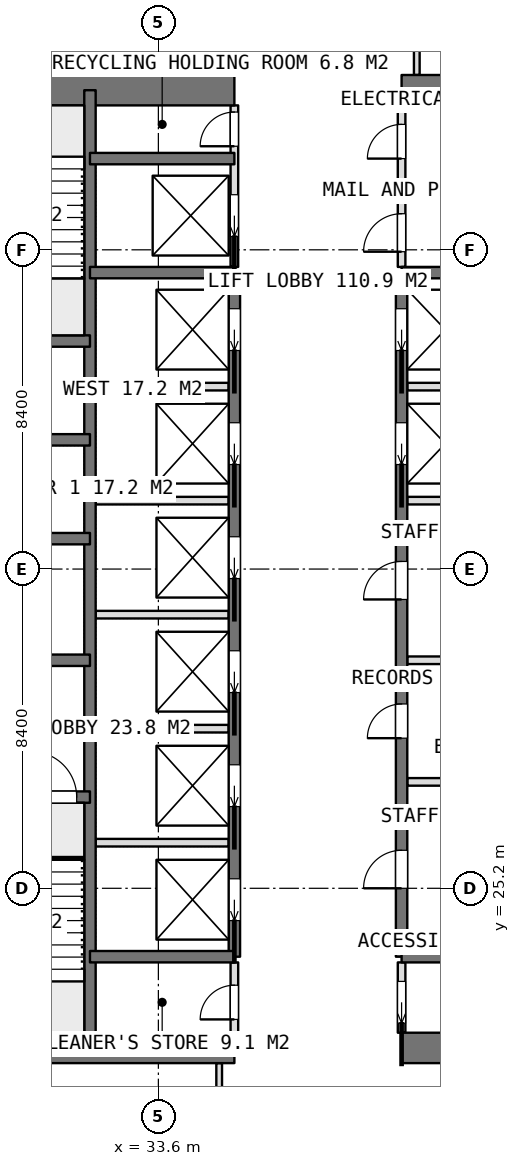
"""IFC4 building model, lengths in metres.
Left out: names, types, materials, properties, quantities, classifications, styles, units other than length and angle.
Written with IfcOpenShell. Run it as: python <this file> out.ifc"""

import sys

from ifc_helpers import new_model, si_unit, direction, frame, frame_2d, origin, place, context, subcontext, project, spatial, rectangle, extrude, element, fill, save


model = new_model("IFC4")
c1 = context("Model", 3, precision=1e-05, world=origin(), true_north=direction((0.0, 1.0)))
c2 = subcontext(c1, "Body", "Model", "MODEL_VIEW")
j1 = project(units=[si_unit("LENGTHUNIT", "METRE"), si_unit("PLANEANGLEUNIT", "RADIAN")], contexts=[c1])
p1 = place(None, origin())
s1 = spatial("IfcSite", under=j1, at=p1, CompositionType="ELEMENT")
p2 = place(p1, origin())
s2 = spatial("IfcBuilding", under=s1, at=p2, CompositionType="ELEMENT")
p3 = place(p2, frame((0.0, 0.0, 291.35)))
s3 = spatial("IfcBuildingStorey", under=s2, at=p3, CompositionType="ELEMENT", Elevation=291.35)
p4 = place(p3, frame((25.2, 21.0, 0.0), z_axis=(0.0, 0.0, 1.0), x_axis=(1.0, 0.0, 0.0)))
e1 = element("IfcWall", 1, at=p4, inside=s3, PredefinedType="SHEAR", context=c2, shape_type="SweptSolid", body=[
    extrude(rectangle(XDim=10.4, YDim=0.8, at=frame_2d((5.2, 0.0))), origin(), (0.0, 0.0, 1.0), 5.4),
])
p5 = place(p3, frame((40.0, 21.0, 0.0), z_axis=(0.0, 0.0, 1.0), x_axis=(1.0, 0.0, 0.0)))
e2 = element("IfcWall", 2, at=p5, inside=s3, PredefinedType="SHEAR", context=c2, shape_type="SweptSolid", body=[
    extrude(rectangle(XDim=10.4, YDim=0.8, at=frame_2d((5.2, 0.0))), origin(), (0.0, 0.0, 1.0), 5.4),
])
p6 = place(p3, frame((25.2, 46.2, 0.0), z_axis=(0.0, 0.0, 1.0), x_axis=(1.0, 0.0, 0.0)))
e3 = element("IfcWall", 3, at=p6, inside=s3, PredefinedType="SHEAR", context=c2, shape_type="SweptSolid", body=[
    extrude(rectangle(XDim=10.4, YDim=0.8, at=frame_2d((5.2, 0.0))), origin(), (0.0, 0.0, 1.0), 5.4),
])
p7 = place(p3, frame((40.0, 46.2, 0.0), z_axis=(0.0, 0.0, 1.0), x_axis=(1.0, 0.0, 0.0)))
e4 = element("IfcWall", 4, at=p7, inside=s3, PredefinedType="SHEAR", context=c2, shape_type="SweptSolid", body=[
    extrude(rectangle(XDim=10.4, YDim=0.8, at=frame_2d((5.2, 0.0))), origin(), (0.0, 0.0, 1.0), 5.4),
])
p8 = place(p3, frame((31.8, 21.0, 0.0), z_axis=(0.0, 0.0, 1.0), x_axis=(0.0, 1.0, 0.0)))
e5 = element("IfcWall", 5, at=p8, inside=s3, PredefinedType="SHEAR", context=c2, shape_type="SweptSolid", body=[
    extrude(rectangle(XDim=25.2, YDim=0.3, at=frame_2d((12.6, 0.0))), origin(), (0.0, 0.0, 1.0), 5.4),
])
p9 = place(p3, frame((35.6, 23.4, 0.0), z_axis=(0.0, 0.0, 1.0), x_axis=(0.0, 1.0, 0.0)))
e6 = element("IfcWall", 6, at=p9, inside=s3, PredefinedType="SHEAR", context=c2, shape_type="SweptSolid", body=[
    extrude(rectangle(XDim=18.0, YDim=0.3, at=frame_2d((9.0, 0.0))), origin(), (0.0, 0.0, 1.0), 5.4),
])
p10 = place(p9, frame((0.95, 0.0, 0.0)))
e7 = element("IfcOpeningElement", 7, at=p10, cuts=e6, PredefinedType="OPENING", context=c2, shape_type="SweptSolid", body=[
    extrude(rectangle(XDim=1.1, YDim=2.1, at=frame_2d((0.55, 1.05))), frame((0.0, 0.16, 0.0), z_axis=(0.0, -1.0, 0.0), x_axis=(1.0, 0.0, 0.0)), (0.0, 0.0, 1.0), 0.32),
])
p11 = place(p9, frame((3.95, 0.0, 0.0)))
e8 = element("IfcOpeningElement", 8, at=p11, cuts=e6, PredefinedType="OPENING", context=c2, shape_type="SweptSolid", body=[
    extrude(rectangle(XDim=1.1, YDim=2.1, at=frame_2d((0.55, 1.05))), frame((0.0, 0.16, 0.0), z_axis=(0.0, -1.0, 0.0), x_axis=(1.0, 0.0, 0.0)), (0.0, 0.0, 1.0), 0.32),
])
p12 = place(p9, frame((6.95, 0.0, 0.0)))
e9 = element("IfcOpeningElement", 9, at=p12, cuts=e6, PredefinedType="OPENING", context=c2, shape_type="SweptSolid", body=[
    extrude(rectangle(XDim=1.1, YDim=2.1, at=frame_2d((0.55, 1.05))), frame((0.0, 0.16, 0.0), z_axis=(0.0, -1.0, 0.0), x_axis=(1.0, 0.0, 0.0)), (0.0, 0.0, 1.0), 0.32),
])
p13 = place(p9, frame((9.95, 0.0, 0.0)))
e10 = element("IfcOpeningElement", 10, at=p13, cuts=e6, PredefinedType="OPENING", context=c2, shape_type="SweptSolid", body=[
    extrude(rectangle(XDim=1.1, YDim=2.1, at=frame_2d((0.55, 1.05))), frame((0.0, 0.16, 0.0), z_axis=(0.0, -1.0, 0.0), x_axis=(1.0, 0.0, 0.0)), (0.0, 0.0, 1.0), 0.32),
])
p14 = place(p9, frame((12.95, 0.0, 0.0)))
e11 = element("IfcOpeningElement", 11, at=p14, cuts=e6, PredefinedType="OPENING", context=c2, shape_type="SweptSolid", body=[
    extrude(rectangle(XDim=1.1, YDim=2.1, at=frame_2d((0.55, 1.05))), frame((0.0, 0.16, 0.0), z_axis=(0.0, -1.0, 0.0), x_axis=(1.0, 0.0, 0.0)), (0.0, 0.0, 1.0), 0.32),
])
p15 = place(p9, frame((15.95, 0.0, 0.0)))
e12 = element("IfcOpeningElement", 12, at=p15, cuts=e6, PredefinedType="OPENING", context=c2, shape_type="SweptSolid", body=[
    extrude(rectangle(XDim=1.1, YDim=2.1, at=frame_2d((0.55, 1.05))), frame((0.0, 0.16, 0.0), z_axis=(0.0, -1.0, 0.0), x_axis=(1.0, 0.0, 0.0)), (0.0, 0.0, 1.0), 0.32),
])
p16 = place(p3, frame((40.0, 23.4, 0.0), z_axis=(0.0, 0.0, 1.0), x_axis=(0.0, 1.0, 0.0)))
e13 = element("IfcWall", 13, at=p16, inside=s3, PredefinedType="SHEAR", context=c2, shape_type="SweptSolid", body=[
    extrude(rectangle(XDim=18.0, YDim=0.3, at=frame_2d((9.0, 0.0))), origin(), (0.0, 0.0, 1.0), 5.4),
])
p17 = place(p16, frame((1.8, 0.0, 0.0)))
e14 = element("IfcOpeningElement", 14, at=p17, cuts=e13, PredefinedType="OPENING", context=c2, shape_type="SweptSolid", body=[
    extrude(rectangle(XDim=1.0, YDim=2.1, at=frame_2d((0.5, 1.05))), frame((0.0, 0.16, 0.0), z_axis=(0.0, -1.0, 0.0), x_axis=(1.0, 0.0, 0.0)), (0.0, 0.0, 1.0), 0.32),
])
p18 = place(p16, frame((5.75, 0.0, 0.0)))
e15 = element("IfcOpeningElement", 15, at=p18, cuts=e13, PredefinedType="OPENING", context=c2, shape_type="SweptSolid", body=[
    extrude(rectangle(XDim=0.9, YDim=2.1, at=frame_2d((0.45, 1.05))), frame((0.0, 0.16, 0.0), z_axis=(0.0, -1.0, 0.0), x_axis=(1.0, 0.0, 0.0)), (0.0, 0.0, 1.0), 0.32),
])
p19 = place(p16, frame((9.4, 0.0, 0.0)))
e16 = element("IfcOpeningElement", 16, at=p19, cuts=e13, PredefinedType="OPENING", context=c2, shape_type="SweptSolid", body=[
    extrude(rectangle(XDim=1.0, YDim=2.1, at=frame_2d((0.5, 1.05))), frame((0.0, 0.16, 0.0), z_axis=(0.0, -1.0, 0.0), x_axis=(1.0, 0.0, 0.0)), (0.0, 0.0, 1.0), 0.32),
])
p20 = place(p16, frame((12.95, 0.0, 0.0)))
e17 = element("IfcOpeningElement", 17, at=p20, cuts=e13, PredefinedType="OPENING", context=c2, shape_type="SweptSolid", body=[
    extrude(rectangle(XDim=1.1, YDim=2.1, at=frame_2d((0.55, 1.05))), frame((0.0, 0.16, 0.0), z_axis=(0.0, -1.0, 0.0), x_axis=(1.0, 0.0, 0.0)), (0.0, 0.0, 1.0), 0.32),
])
p21 = place(p16, frame((15.95, 0.0, 0.0)))
e18 = element("IfcOpeningElement", 18, at=p21, cuts=e13, PredefinedType="OPENING", context=c2, shape_type="SweptSolid", body=[
    extrude(rectangle(XDim=1.1, YDim=2.1, at=frame_2d((0.55, 1.05))), frame((0.0, 0.16, 0.0), z_axis=(0.0, -1.0, 0.0), x_axis=(1.0, 0.0, 0.0)), (0.0, 0.0, 1.0), 0.32),
])
for number, where, z_axis, x_axis in (
    (19, (31.8, 23.4, 0.0), (0.0, 0.0, 1.0), (1.0, 0.0, 0.0)),
    (20, (31.8, 41.4, 0.0), (0.0, 0.0, 1.0), (1.0, 0.0, 0.0)),
    (21, (31.8, 44.4, 0.0), (0.0, 0.0, 1.0), (1.0, 0.0, 0.0)),
    (22, (40.0, 23.4, 0.0), (0.0, 0.0, 1.0), (1.0, 0.0, 0.0)),
    (23, (40.0, 41.4, 0.0), (0.0, 0.0, 1.0), (1.0, 0.0, 0.0)),
):
    element("IfcWall", number, at=place(p3, frame(where, z_axis=z_axis, x_axis=x_axis)), inside=s3, PredefinedType="SHEAR", context=c2, shape_type="SweptSolid", body=[
        extrude(rectangle(XDim=3.8, YDim=0.3, at=frame_2d((1.9, 0.0))), origin(), (0.0, 0.0, 1.0), 5.4),
    ])
p22 = place(p3, frame((25.2, 27.6, 0.0), z_axis=(0.0, 0.0, 1.0), x_axis=(1.0, 0.0, 0.0)))
e24 = element("IfcWall", 24, at=p22, inside=s3, PredefinedType="SHEAR", context=c2, shape_type="SweptSolid", body=[
    extrude(rectangle(XDim=6.6, YDim=0.3, at=frame_2d((3.3, 0.0))), origin(), (0.0, 0.0, 1.0), 5.4),
])
p23 = place(p22, frame((5.05, 0.0, 0.0)))
e25 = element("IfcOpeningElement", 25, at=p23, cuts=e24, PredefinedType="OPENING", context=c2, shape_type="SweptSolid", body=[
    extrude(rectangle(XDim=1.2, YDim=2.1, at=frame_2d((0.6, 1.05))), frame((0.0, 0.16, 0.0), z_axis=(0.0, -1.0, 0.0), x_axis=(1.0, 0.0, 0.0)), (0.0, 0.0, 1.0), 0.32),
])
p24 = place(p3, frame((25.2, 31.2, 0.0), z_axis=(0.0, 0.0, 1.0), x_axis=(1.0, 0.0, 0.0)))
e26 = element("IfcWall", 26, at=p24, inside=s3, PredefinedType="SHEAR", context=c2, shape_type="SweptSolid", body=[
    extrude(rectangle(XDim=6.6, YDim=0.3, at=frame_2d((3.3, 0.0))), origin(), (0.0, 0.0, 1.0), 5.4),
])
p25 = place(p24, frame((2.65, 0.0, 0.0)))
e27 = element("IfcOpeningElement", 27, at=p25, cuts=e26, PredefinedType="OPENING", context=c2, shape_type="SweptSolid", body=[
    extrude(rectangle(XDim=1.3, YDim=2.1, at=frame_2d((0.65, 1.05))), frame((0.0, 0.16, 0.0), z_axis=(0.0, -1.0, 0.0), x_axis=(1.0, 0.0, 0.0)), (0.0, 0.0, 1.0), 0.32),
])
for number, where, z_axis, x_axis in (
    (28, (25.2, 34.4, 0.0), (0.0, 0.0, 1.0), (1.0, 0.0, 0.0)),
    (29, (25.2, 37.0, 0.0), (0.0, 0.0, 1.0), (1.0, 0.0, 0.0)),
    (30, (25.2, 39.6, 0.0), (0.0, 0.0, 1.0), (1.0, 0.0, 0.0)),
):
    element("IfcWall", number, at=place(p3, frame(where, z_axis=z_axis, x_axis=x_axis)), inside=s3, PredefinedType="SHEAR", context=c2, shape_type="SweptSolid", body=[
        extrude(rectangle(XDim=6.6, YDim=0.3, at=frame_2d((3.3, 0.0))), origin(), (0.0, 0.0, 1.0), 5.4),
    ])
for number, where, z_axis, x_axis in (
    (31, (31.95, 26.4, 0.0), (0.0, 0.0, 1.0), (1.0, 0.0, 0.0)),
    (32, (31.95, 29.4, 0.0), (0.0, 0.0, 1.0), (1.0, 0.0, 0.0)),
    (33, (31.95, 32.4, 0.0), (0.0, 0.0, 1.0), (1.0, 0.0, 0.0)),
    (34, (31.95, 35.4, 0.0), (0.0, 0.0, 1.0), (1.0, 0.0, 0.0)),
    (35, (31.95, 38.4, 0.0), (0.0, 0.0, 1.0), (1.0, 0.0, 0.0)),
    (36, (40.15, 35.4, 0.0), (0.0, 0.0, 1.0), (1.0, 0.0, 0.0)),
    (37, (40.15, 38.4, 0.0), (0.0, 0.0, 1.0), (1.0, 0.0, 0.0)),
):
    element("IfcWall", number, at=place(p3, frame(where, z_axis=z_axis, x_axis=x_axis)), inside=s3, PredefinedType="PARTITIONING", context=c2, shape_type="SweptSolid", body=[
        extrude(rectangle(XDim=3.5, YDim=0.2, at=frame_2d((1.75, 0.0))), origin(), (0.0, 0.0, 1.0), 5.1),
    ])
p26 = place(p3, frame((40.0, 21.4, 0.0), z_axis=(0.0, 0.0, 1.0), x_axis=(0.0, 1.0, 0.0)))
e38 = element("IfcWall", 38, at=p26, inside=s3, PredefinedType="PARTITIONING", context=c2, shape_type="SweptSolid", body=[
    extrude(rectangle(XDim=1.85, YDim=0.2, at=frame_2d((0.925, 0.0))), origin(), (0.0, 0.0, 1.0), 5.1),
])
p27 = place(p26, frame((0.25, 0.0, 0.0)))
e39 = element("IfcOpeningElement", 39, at=p27, cuts=e38, PredefinedType="OPENING", context=c2, shape_type="SweptSolid", body=[
    extrude(rectangle(XDim=1.1, YDim=2.1, at=frame_2d((0.55, 1.05))), frame((0.0, 0.11, 0.0), z_axis=(0.0, -1.0, 0.0), x_axis=(1.0, 0.0, 0.0)), (0.0, 0.0, 1.0), 0.22),
])
p28 = place(p3, frame((40.0, 41.55, 0.0), z_axis=(0.0, 0.0, 1.0), x_axis=(0.0, 1.0, 0.0)))
e40 = element("IfcWall", 40, at=p28, inside=s3, PredefinedType="PARTITIONING", context=c2, shape_type="SweptSolid", body=[
    extrude(rectangle(XDim=4.25, YDim=0.2, at=frame_2d((2.125, 0.0))), origin(), (0.0, 0.0, 1.0), 5.1),
])
p29 = place(p28, frame((2.85, 0.0, 0.0)))
e41 = element("IfcOpeningElement", 41, at=p29, cuts=e40, PredefinedType="OPENING", context=c2, shape_type="SweptSolid", body=[
    extrude(rectangle(XDim=0.9, YDim=2.1, at=frame_2d((0.45, 1.05))), frame((0.0, 0.11, 0.0), z_axis=(0.0, -1.0, 0.0), x_axis=(1.0, 0.0, 0.0)), (0.0, 0.0, 1.0), 0.22),
])
p30 = place(p28, frame((0.4, 0.0, 0.0)))
e42 = element("IfcOpeningElement", 42, at=p30, cuts=e40, PredefinedType="OPENING", context=c2, shape_type="SweptSolid", body=[
    extrude(rectangle(XDim=1.0, YDim=2.1, at=frame_2d((0.5, 1.05))), frame((0.0, 0.11, 0.0), z_axis=(0.0, -1.0, 0.0), x_axis=(1.0, 0.0, 0.0)), (0.0, 0.0, 1.0), 0.22),
])
p31 = place(p3, frame((35.6, 41.55, 0.0), z_axis=(0.0, 0.0, 1.0), x_axis=(0.0, 1.0, 0.0)))
e43 = element("IfcWall", 43, at=p31, inside=s3, PredefinedType="PARTITIONING", context=c2, shape_type="SweptSolid", body=[
    extrude(rectangle(XDim=4.25, YDim=0.2, at=frame_2d((2.125, 0.0))), origin(), (0.0, 0.0, 1.0), 5.1),
])
p32 = place(p31, frame((3.175, 0.0, 0.0)))
e44 = element("IfcOpeningElement", 44, at=p32, cuts=e43, PredefinedType="OPENING", context=c2, shape_type="SweptSolid", body=[
    extrude(rectangle(XDim=0.9, YDim=2.1, at=frame_2d((0.45, 1.05))), frame((0.0, 0.11, 0.0), z_axis=(0.0, -1.0, 0.0), x_axis=(1.0, 0.0, 0.0)), (0.0, 0.0, 1.0), 0.22),
])
p33 = place(p31, frame((0.8, 0.0, 0.0)))
e45 = element("IfcOpeningElement", 45, at=p33, cuts=e43, PredefinedType="OPENING", context=c2, shape_type="SweptSolid", body=[
    extrude(rectangle(XDim=1.1, YDim=2.1, at=frame_2d((0.55, 1.05))), frame((0.0, 0.11, 0.0), z_axis=(0.0, -1.0, 0.0), x_axis=(1.0, 0.0, 0.0)), (0.0, 0.0, 1.0), 0.22),
])
p34 = place(p3, frame((35.6, 21.4, 0.0), z_axis=(0.0, 0.0, 1.0), x_axis=(0.0, 1.0, 0.0)))
e46 = element("IfcWall", 46, at=p34, inside=s3, PredefinedType="PARTITIONING", context=c2, shape_type="SweptSolid", body=[
    extrude(rectangle(XDim=1.85, YDim=0.2, at=frame_2d((0.925, 0.0))), origin(), (0.0, 0.0, 1.0), 5.1),
])
p35 = place(p34, frame((0.35, 0.0, 0.0)))
e47 = element("IfcOpeningElement", 47, at=p35, cuts=e46, PredefinedType="OPENING", context=c2, shape_type="SweptSolid", body=[
    extrude(rectangle(XDim=0.9, YDim=2.1, at=frame_2d((0.45, 1.05))), frame((0.0, 0.11, 0.0), z_axis=(0.0, -1.0, 0.0), x_axis=(1.0, 0.0, 0.0)), (0.0, 0.0, 1.0), 0.22),
])
for number, where, z_axis, x_axis in (
    (48, (40.15, 28.0, 0.0), (0.0, 0.0, 1.0), (1.0, 0.0, 0.0)),
    (49, (40.15, 31.2, 0.0), (0.0, 0.0, 1.0), (1.0, 0.0, 0.0)),
):
    element("IfcWall", number, at=place(p3, frame(where, z_axis=z_axis, x_axis=x_axis)), inside=s3, PredefinedType="PARTITIONING", context=c2, shape_type="SweptSolid", body=[
        extrude(rectangle(XDim=3.5, YDim=0.2, at=frame_2d((1.75, 0.0))), origin(), (0.0, 0.0, 1.0), 5.1),
    ])
p36 = place(p3, frame((40.0, 43.5, 0.0), z_axis=(0.0, 0.0, 1.0), x_axis=(1.0, 0.0, 0.0)))
e50 = element("IfcWall", 50, at=p36, inside=s3, PredefinedType="PARTITIONING", context=c2, shape_type="SweptSolid", body=[
    extrude(rectangle(XDim=3.65, YDim=0.2, at=frame_2d((1.825, 0.0))), origin(), (0.0, 0.0, 1.0), 5.1),
])
for number, where, z_axis, x_axis in (
    (51, (40.4, 46.6, 0.0), (0.0, 0.0, 1.0), (0.0, 1.0, 0.0)),
    (52, (35.2, 46.6, 0.0), (0.0, 0.0, 1.0), (0.0, 1.0, 0.0)),
):
    element("IfcWall", number, at=place(p3, frame(where, z_axis=z_axis, x_axis=x_axis)), inside=s3, PredefinedType="PARTITIONING", context=c2, shape_type="SweptSolid", body=[
        extrude(rectangle(XDim=2.725, YDim=0.15, at=frame_2d((1.362, 0.0))), origin(), (0.0, 0.0, 1.0), 5.1),
    ])
p37 = place(p3, frame((35.2, 17.875, 0.0), z_axis=(0.0, 0.0, 1.0), x_axis=(0.0, 1.0, 0.0)))
e53 = element("IfcWall", 53, at=p37, inside=s3, PredefinedType="PARTITIONING", context=c2, shape_type="SweptSolid", body=[
    extrude(rectangle(XDim=2.725, YDim=0.15, at=frame_2d((1.363, 0.0))), origin(), (0.0, 0.0, 1.0), 5.1),
])
p38 = place(p27, origin())
e54 = element("IfcDoor", 54, at=p38, inside=s3, OperationType="SLIDING_TO_LEFT", PredefinedType="DOOR", context=c2, shape_type="SweptSolid", body=[
    extrude(rectangle(XDim=1.1, YDim=2.1, at=frame_2d((0.55, 1.05))), frame((0.0, 0.025, 0.0), z_axis=(0.0, -1.0, 0.0), x_axis=(1.0, 0.0, 0.0)), (0.0, 0.0, 1.0), 0.05),
])
fill(e39, e54)
p39 = place(p35, origin())
e55 = element("IfcDoor", 55, at=p39, inside=s3, OperationType="SINGLE_SWING_LEFT", PredefinedType="DOOR", context=c2, shape_type="SweptSolid", body=[
    extrude(rectangle(XDim=0.9, YDim=2.1, at=frame_2d((0.45, 1.05))), frame((0.0, 0.025, 0.0), z_axis=(0.0, -1.0, 0.0), x_axis=(1.0, 0.0, 0.0)), (0.0, 0.0, 1.0), 0.05),
])
fill(e47, e55)
p40 = place(p29, origin())
e56 = element("IfcDoor", 56, at=p40, inside=s3, OperationType="SINGLE_SWING_LEFT", PredefinedType="DOOR", context=c2, shape_type="SweptSolid", body=[
    extrude(rectangle(XDim=0.9, YDim=2.1, at=frame_2d((0.45, 1.05))), frame((0.0, 0.025, 0.0), z_axis=(0.0, -1.0, 0.0), x_axis=(1.0, 0.0, 0.0)), (0.0, 0.0, 1.0), 0.05),
])
fill(e41, e56)
p41 = place(p30, origin())
e57 = element("IfcDoor", 57, at=p41, inside=s3, OperationType="SINGLE_SWING_LEFT", PredefinedType="DOOR", context=c2, shape_type="SweptSolid", body=[
    extrude(rectangle(XDim=1.0, YDim=2.1, at=frame_2d((0.5, 1.05))), frame((0.0, 0.025, 0.0), z_axis=(0.0, -1.0, 0.0), x_axis=(1.0, 0.0, 0.0)), (0.0, 0.0, 1.0), 0.05),
])
fill(e42, e57)
p42 = place(p17, origin())
e58 = element("IfcDoor", 58, at=p42, inside=s3, OperationType="SINGLE_SWING_LEFT", PredefinedType="DOOR", context=c2, shape_type="SweptSolid", body=[
    extrude(rectangle(XDim=1.0, YDim=2.1, at=frame_2d((0.5, 1.05))), frame((0.0, 0.025, 0.0), z_axis=(0.0, -1.0, 0.0), x_axis=(1.0, 0.0, 0.0)), (0.0, 0.0, 1.0), 0.05),
])
fill(e14, e58)
p43 = place(p18, origin())
e59 = element("IfcDoor", 59, at=p43, inside=s3, OperationType="SINGLE_SWING_LEFT", PredefinedType="DOOR", context=c2, shape_type="SweptSolid", body=[
    extrude(rectangle(XDim=0.9, YDim=2.1, at=frame_2d((0.45, 1.05))), frame((0.0, 0.025, 0.0), z_axis=(0.0, -1.0, 0.0), x_axis=(1.0, 0.0, 0.0)), (0.0, 0.0, 1.0), 0.05),
])
fill(e15, e59)
p44 = place(p19, origin())
e60 = element("IfcDoor", 60, at=p44, inside=s3, OperationType="SINGLE_SWING_LEFT", PredefinedType="DOOR", context=c2, shape_type="SweptSolid", body=[
    extrude(rectangle(XDim=1.0, YDim=2.1, at=frame_2d((0.5, 1.05))), frame((0.0, 0.025, 0.0), z_axis=(0.0, -1.0, 0.0), x_axis=(1.0, 0.0, 0.0)), (0.0, 0.0, 1.0), 0.05),
])
fill(e16, e60)
p45 = place(p32, origin())
e61 = element("IfcDoor", 61, at=p45, inside=s3, OperationType="SINGLE_SWING_LEFT", PredefinedType="DOOR", context=c2, shape_type="SweptSolid", body=[
    extrude(rectangle(XDim=0.9, YDim=2.1, at=frame_2d((0.45, 1.05))), frame((0.0, 0.025, 0.0), z_axis=(0.0, -1.0, 0.0), x_axis=(1.0, 0.0, 0.0)), (0.0, 0.0, 1.0), 0.05),
])
fill(e44, e61)
p46 = place(p10, origin())
e62 = element("IfcDoor", 62, at=p46, inside=s3, OperationType="SLIDING_TO_LEFT", PredefinedType="USERDEFINED", context=c2, shape_type="SweptSolid", body=[
    extrude(rectangle(XDim=1.1, YDim=2.1, at=frame_2d((0.55, 1.05))), frame((0.0, 0.025, 0.0), z_axis=(0.0, -1.0, 0.0), x_axis=(1.0, 0.0, 0.0)), (0.0, 0.0, 1.0), 0.05),
])
fill(e7, e62)
p47 = place(p11, origin())
e63 = element("IfcDoor", 63, at=p47, inside=s3, OperationType="SLIDING_TO_LEFT", PredefinedType="USERDEFINED", context=c2, shape_type="SweptSolid", body=[
    extrude(rectangle(XDim=1.1, YDim=2.1, at=frame_2d((0.55, 1.05))), frame((0.0, 0.025, 0.0), z_axis=(0.0, -1.0, 0.0), x_axis=(1.0, 0.0, 0.0)), (0.0, 0.0, 1.0), 0.05),
])
fill(e8, e63)
p48 = place(p12, origin())
e64 = element("IfcDoor", 64, at=p48, inside=s3, OperationType="SLIDING_TO_LEFT", PredefinedType="USERDEFINED", context=c2, shape_type="SweptSolid", body=[
    extrude(rectangle(XDim=1.1, YDim=2.1, at=frame_2d((0.55, 1.05))), frame((0.0, 0.025, 0.0), z_axis=(0.0, -1.0, 0.0), x_axis=(1.0, 0.0, 0.0)), (0.0, 0.0, 1.0), 0.05),
])
fill(e9, e64)
p49 = place(p13, origin())
e65 = element("IfcDoor", 65, at=p49, inside=s3, OperationType="SLIDING_TO_LEFT", PredefinedType="USERDEFINED", context=c2, shape_type="SweptSolid", body=[
    extrude(rectangle(XDim=1.1, YDim=2.1, at=frame_2d((0.55, 1.05))), frame((0.0, 0.025, 0.0), z_axis=(0.0, -1.0, 0.0), x_axis=(1.0, 0.0, 0.0)), (0.0, 0.0, 1.0), 0.05),
])
fill(e10, e65)
p50 = place(p14, origin())
e66 = element("IfcDoor", 66, at=p50, inside=s3, OperationType="SLIDING_TO_LEFT", PredefinedType="USERDEFINED", context=c2, shape_type="SweptSolid", body=[
    extrude(rectangle(XDim=1.1, YDim=2.1, at=frame_2d((0.55, 1.05))), frame((0.0, 0.025, 0.0), z_axis=(0.0, -1.0, 0.0), x_axis=(1.0, 0.0, 0.0)), (0.0, 0.0, 1.0), 0.05),
])
fill(e11, e66)
p51 = place(p15, origin())
e67 = element("IfcDoor", 67, at=p51, inside=s3, OperationType="SLIDING_TO_LEFT", PredefinedType="USERDEFINED", context=c2, shape_type="SweptSolid", body=[
    extrude(rectangle(XDim=1.1, YDim=2.1, at=frame_2d((0.55, 1.05))), frame((0.0, 0.025, 0.0), z_axis=(0.0, -1.0, 0.0), x_axis=(1.0, 0.0, 0.0)), (0.0, 0.0, 1.0), 0.05),
])
fill(e12, e67)
p52 = place(p20, origin())
e68 = element("IfcDoor", 68, at=p52, inside=s3, OperationType="SLIDING_TO_LEFT", PredefinedType="USERDEFINED", context=c2, shape_type="SweptSolid", body=[
    extrude(rectangle(XDim=1.1, YDim=2.1, at=frame_2d((0.55, 1.05))), frame((0.0, 0.025, 0.0), z_axis=(0.0, -1.0, 0.0), x_axis=(1.0, 0.0, 0.0)), (0.0, 0.0, 1.0), 0.05),
])
fill(e17, e68)
p53 = place(p21, origin())
e69 = element("IfcDoor", 69, at=p53, inside=s3, OperationType="SLIDING_TO_LEFT", PredefinedType="USERDEFINED", context=c2, shape_type="SweptSolid", body=[
    extrude(rectangle(XDim=1.1, YDim=2.1, at=frame_2d((0.55, 1.05))), frame((0.0, 0.025, 0.0), z_axis=(0.0, -1.0, 0.0), x_axis=(1.0, 0.0, 0.0)), (0.0, 0.0, 1.0), 0.05),
])
fill(e18, e69)
p54 = place(p33, origin())
e70 = element("IfcDoor", 70, at=p54, inside=s3, OperationType="SLIDING_TO_LEFT", PredefinedType="USERDEFINED", context=c2, shape_type="SweptSolid", body=[
    extrude(rectangle(XDim=1.1, YDim=2.1, at=frame_2d((0.55, 1.05))), frame((0.0, 0.025, 0.0), z_axis=(0.0, -1.0, 0.0), x_axis=(1.0, 0.0, 0.0)), (0.0, 0.0, 1.0), 0.05),
])
fill(e45, e70)
p55 = place(p23, origin())
e71 = element("IfcDoor", 71, at=p55, inside=s3, OperationType="SINGLE_SWING_RIGHT", PredefinedType="DOOR", context=c2, shape_type="SweptSolid", body=[
    extrude(rectangle(XDim=1.2, YDim=2.1, at=frame_2d((0.6, 1.05))), frame((0.0, 0.025, 0.0), z_axis=(0.0, -1.0, 0.0), x_axis=(1.0, 0.0, 0.0)), (0.0, 0.0, 1.0), 0.05),
])
fill(e25, e71)
save(model, sys.argv[1])
